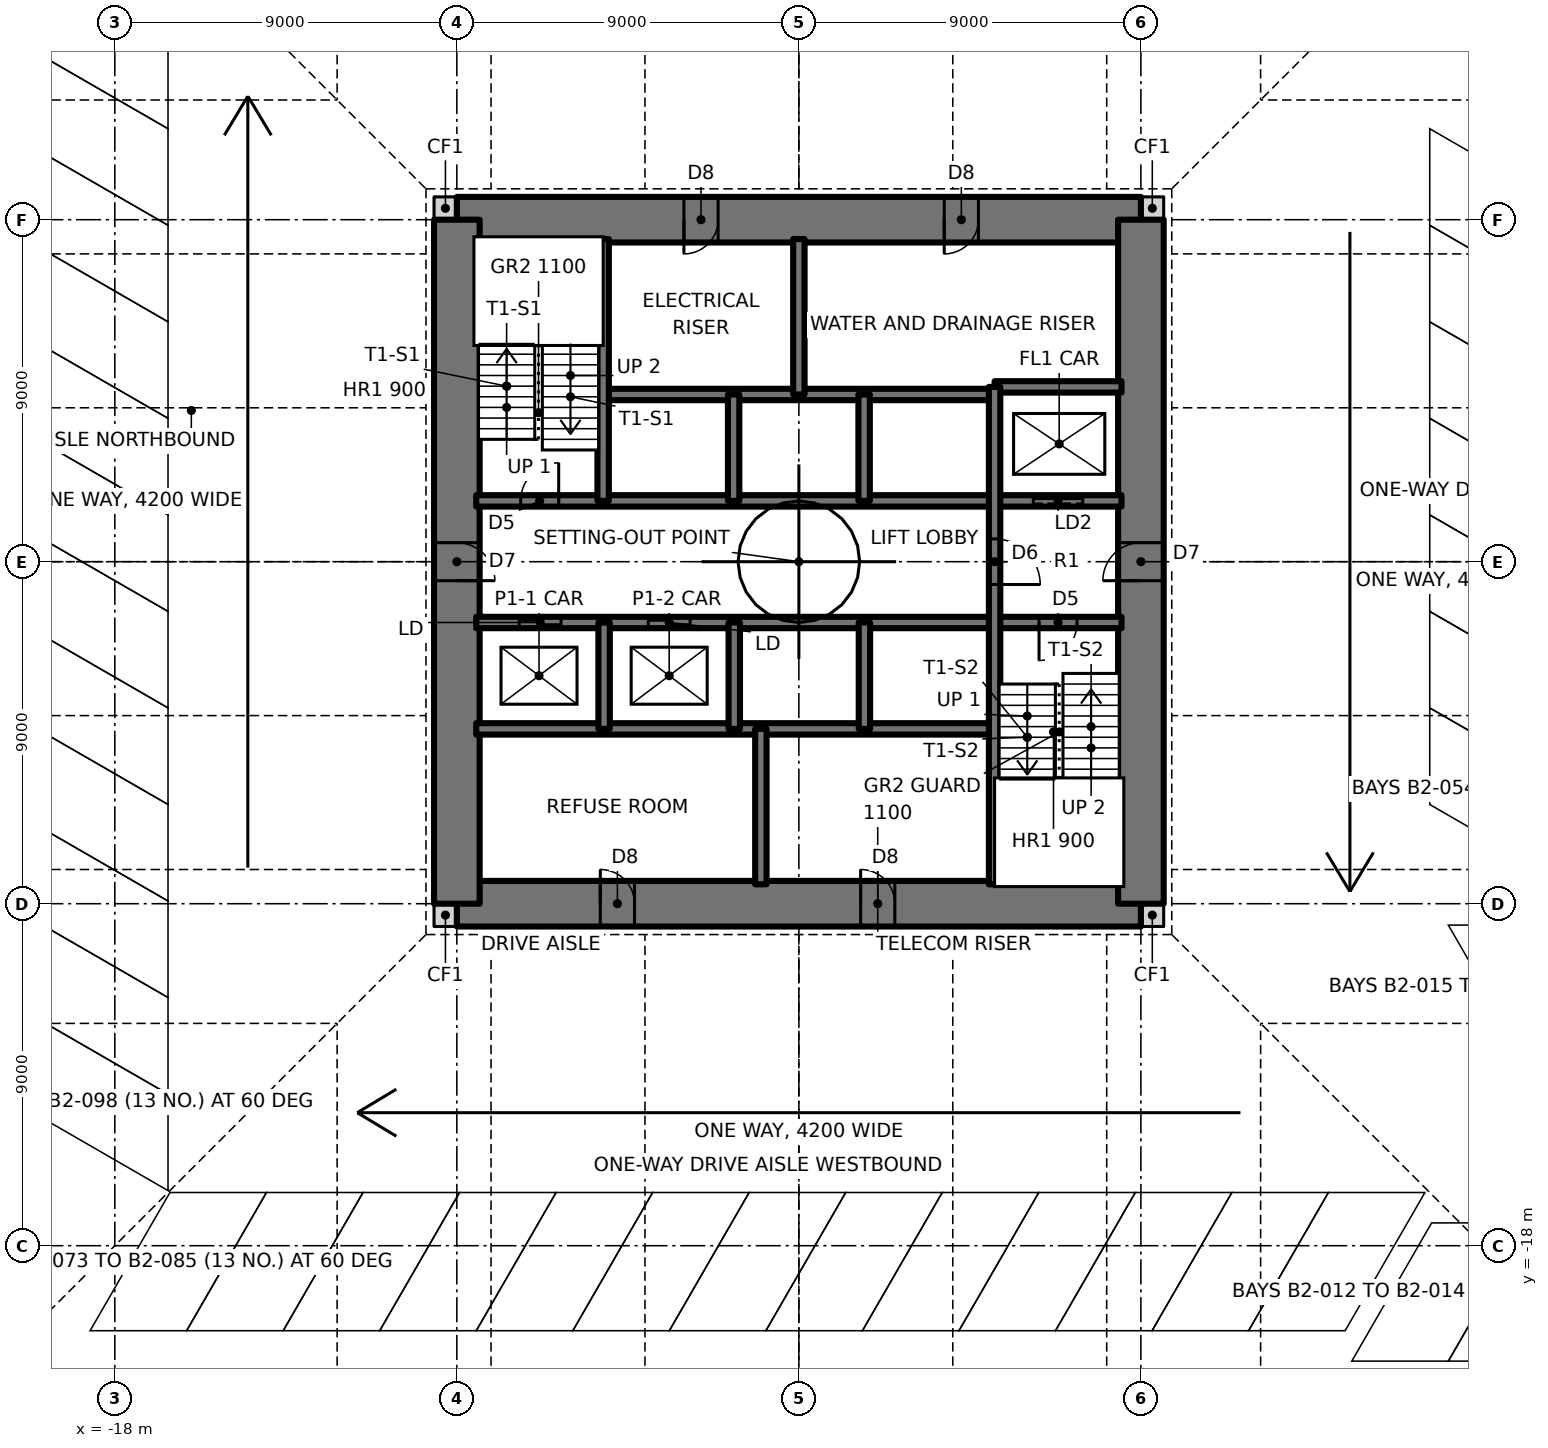
"""IFC4 building model, lengths in metres.
Left out: names, types, materials, properties, quantities, classifications, styles, units other than length and angle.
Written with IfcOpenShell. Run it as: python <this file> out.ifc"""

import sys

from ifc_helpers import new_model, si_unit, direction, frame, frame_2d, origin, place, context, subcontext, project, spatial, rectangle, extrude, element, fill, save


model = new_model("IFC4")
c1 = context("Model", 3, precision=1e-05, world=origin(), true_north=direction((0.0, 1.0)))
c2 = subcontext(c1, "Body", "Model", "MODEL_VIEW")
j1 = project(units=[si_unit("LENGTHUNIT", "METRE"), si_unit("PLANEANGLEUNIT", "RADIAN")], contexts=[c1])
p1 = place(None, origin())
s1 = spatial("IfcSite", under=j1, at=p1, CompositionType="ELEMENT")
p2 = place(p1, origin())
s2 = spatial("IfcBuilding", under=s1, at=p2, CompositionType="ELEMENT")
p3 = place(p2, frame((0.0, 0.0, -7.2)))
s3 = spatial("IfcBuildingStorey", under=s2, at=p3, CompositionType="ELEMENT", Elevation=-7.2)
for number, where, z_axis, x_axis in (
    (1, (-9.6, -9.3, -1.8), (0.0, 0.0, 1.0), (1.0, 0.0, 0.0)),
    (2, (9.0, -9.3, -1.8), (0.0, 0.0, 1.0), (1.0, 0.0, 0.0)),
    (3, (9.0, 9.3, -1.8), (0.0, 0.0, 1.0), (1.0, 0.0, 0.0)),
    (4, (-9.6, 9.3, -1.8), (0.0, 0.0, 1.0), (1.0, 0.0, 0.0)),
):
    element("IfcWall", number, at=place(p3, frame(where, z_axis=z_axis, x_axis=x_axis)), inside=s3, PredefinedType="SOLIDWALL", context=c2, shape_type="SweptSolid", body=[
        extrude(rectangle(XDim=0.6, YDim=0.6, at=frame_2d((0.3, 0.0))), origin(), (0.0, 0.0, 1.0), 5.4),
    ])
p4 = place(p3, frame((-9.0, -9.0, -1.8), z_axis=(0.0, 0.0, 1.0), x_axis=(1.0, 0.0, 0.0)))
e5 = element("IfcWall", 5, at=p4, inside=s3, PredefinedType="SHEAR", context=c2, shape_type="SweptSolid", body=[
    extrude(rectangle(XDim=18.0, YDim=1.2, at=frame_2d((9.0, 0.0))), origin(), (0.0, 0.0, 1.0), 5.4),
])
p5 = place(p4, frame((3.775, 0.0, 1.8)))
e6 = element("IfcOpeningElement", 6, at=p5, cuts=e5, PredefinedType="OPENING", context=c2, shape_type="SweptSolid", body=[
    extrude(rectangle(XDim=0.9, YDim=2.1, at=frame_2d((0.45, 1.05))), frame((0.0, 0.61, 0.0), z_axis=(0.0, -1.0, 0.0), x_axis=(1.0, 0.0, 0.0)), (0.0, 0.0, 1.0), 1.22),
])
p6 = place(p4, frame((10.625, 0.0, 1.8)))
e7 = element("IfcOpeningElement", 7, at=p6, cuts=e5, PredefinedType="OPENING", context=c2, shape_type="SweptSolid", body=[
    extrude(rectangle(XDim=0.9, YDim=2.1, at=frame_2d((0.45, 1.05))), frame((0.0, 0.61, 0.0), z_axis=(0.0, -1.0, 0.0), x_axis=(1.0, 0.0, 0.0)), (0.0, 0.0, 1.0), 1.22),
])
p7 = place(p3, frame((9.0, 9.0, -1.8), z_axis=(0.0, 0.0, 1.0), x_axis=(-1.0, 0.0, 0.0)))
e8 = element("IfcWall", 8, at=p7, inside=s3, PredefinedType="SHEAR", context=c2, shape_type="SweptSolid", body=[
    extrude(rectangle(XDim=18.0, YDim=1.2, at=frame_2d((9.0, 0.0))), origin(), (0.0, 0.0, 1.0), 5.4),
])
p8 = place(p7, frame((11.125, 0.0, 1.8)))
e9 = element("IfcOpeningElement", 9, at=p8, cuts=e8, PredefinedType="OPENING", context=c2, shape_type="SweptSolid", body=[
    extrude(rectangle(XDim=0.9, YDim=2.1, at=frame_2d((0.45, 1.05))), frame((0.0, 0.61, 0.0), z_axis=(0.0, -1.0, 0.0), x_axis=(1.0, 0.0, 0.0)), (0.0, 0.0, 1.0), 1.22),
])
p9 = place(p7, frame((4.275, 0.0, 1.8)))
e10 = element("IfcOpeningElement", 10, at=p9, cuts=e8, PredefinedType="OPENING", context=c2, shape_type="SweptSolid", body=[
    extrude(rectangle(XDim=0.9, YDim=2.1, at=frame_2d((0.45, 1.05))), frame((0.0, 0.61, 0.0), z_axis=(0.0, -1.0, 0.0), x_axis=(1.0, 0.0, 0.0)), (0.0, 0.0, 1.0), 1.22),
])
p10 = place(p3, frame((9.0, -9.0, -1.8), z_axis=(0.0, 0.0, 1.0), x_axis=(0.0, 1.0, 0.0)))
e11 = element("IfcWall", 11, at=p10, inside=s3, PredefinedType="SHEAR", context=c2, shape_type="SweptSolid", body=[
    extrude(rectangle(XDim=18.0, YDim=1.2, at=frame_2d((9.0, 0.0))), origin(), (0.0, 0.0, 1.0), 5.4),
])
p11 = place(p10, frame((8.5, 0.0, 1.8)))
e12 = element("IfcOpeningElement", 12, at=p11, cuts=e11, PredefinedType="OPENING", context=c2, shape_type="SweptSolid", body=[
    extrude(rectangle(XDim=1.0, YDim=2.1, at=frame_2d((0.5, 1.05))), frame((0.0, 0.61, 0.0), z_axis=(0.0, -1.0, 0.0), x_axis=(1.0, 0.0, 0.0)), (0.0, 0.0, 1.0), 1.22),
])
p12 = place(p3, frame((-9.0, 9.0, -1.8), z_axis=(0.0, 0.0, 1.0), x_axis=(0.0, -1.0, 0.0)))
e13 = element("IfcWall", 13, at=p12, inside=s3, PredefinedType="SHEAR", context=c2, shape_type="SweptSolid", body=[
    extrude(rectangle(XDim=18.0, YDim=1.2, at=frame_2d((9.0, 0.0))), origin(), (0.0, 0.0, 1.0), 5.4),
])
p13 = place(p12, frame((8.5, 0.0, 1.8)))
e14 = element("IfcOpeningElement", 14, at=p13, cuts=e13, PredefinedType="OPENING", context=c2, shape_type="SweptSolid", body=[
    extrude(rectangle(XDim=1.0, YDim=2.1, at=frame_2d((0.5, 1.05))), frame((0.0, 0.61, 0.0), z_axis=(0.0, -1.0, 0.0), x_axis=(1.0, 0.0, 0.0)), (0.0, 0.0, 1.0), 1.22),
])
p14 = place(p3, frame((-29.55, -18.0, -1.8), z_axis=(0.0, 0.0, 1.0), x_axis=(1.0, 0.0, 0.0)))
e15 = element("IfcWall", 15, at=p14, inside=s3, PredefinedType="SOLIDWALL", context=c2, shape_type="SweptSolid", body=[
    extrude(rectangle(XDim=59.1, YDim=0.45, at=frame_2d((29.55, 0.0))), origin(), (0.0, 0.0, 1.0), 1.5),
])
for number, where, z_axis, x_axis in (
    (16, (-29.55, -9.0, -1.8), (0.0, 0.0, 1.0), (1.0, 0.0, 0.0)),
    (17, (9.6, -9.0, -1.8), (0.0, 0.0, 1.0), (1.0, 0.0, 0.0)),
    (18, (-29.55, 0.0, -1.8), (0.0, 0.0, 1.0), (1.0, 0.0, 0.0)),
    (19, (9.6, 0.0, -1.8), (0.0, 0.0, 1.0), (1.0, 0.0, 0.0)),
    (20, (-29.55, 9.0, -1.8), (0.0, 0.0, 1.0), (1.0, 0.0, 0.0)),
    (21, (9.6, 9.0, -1.8), (0.0, 0.0, 1.0), (1.0, 0.0, 0.0)),
):
    element("IfcWall", number, at=place(p3, frame(where, z_axis=z_axis, x_axis=x_axis)), inside=s3, PredefinedType="SOLIDWALL", context=c2, shape_type="SweptSolid", body=[
        extrude(rectangle(XDim=19.95, YDim=0.45, at=frame_2d((9.975, 0.0))), origin(), (0.0, 0.0, 1.0), 1.5),
    ])
for number, where, z_axis, x_axis in (
    (22, (-18.0, -26.775, -1.8), (0.0, 0.0, 1.0), (0.0, 1.0, 0.0)),
    (23, (-18.0, -17.775, -1.8), (0.0, 0.0, 1.0), (0.0, 1.0, 0.0)),
    (24, (-18.0, -8.775, -1.8), (0.0, 0.0, 1.0), (0.0, 1.0, 0.0)),
    (25, (-18.0, 0.225, -1.8), (0.0, 0.0, 1.0), (0.0, 1.0, 0.0)),
    (26, (-18.0, 9.225, -1.8), (0.0, 0.0, 1.0), (0.0, 1.0, 0.0)),
    (27, (-9.0, -26.775, -1.8), (0.0, 0.0, 1.0), (0.0, 1.0, 0.0)),
):
    element("IfcWall", number, at=place(p3, frame(where, z_axis=z_axis, x_axis=x_axis)), inside=s3, PredefinedType="SOLIDWALL", context=c2, shape_type="SweptSolid", body=[
        extrude(rectangle(XDim=8.55, YDim=0.45, at=frame_2d((4.275, 0.0))), origin(), (0.0, 0.0, 1.0), 1.5),
    ])
for number, where, z_axis, x_axis in (
    (28, (-9.0, -17.775, -1.8), (0.0, 0.0, 1.0), (0.0, 1.0, 0.0)),
    (29, (-9.0, 9.6, -1.8), (0.0, 0.0, 1.0), (0.0, 1.0, 0.0)),
):
    element("IfcWall", number, at=place(p3, frame(where, z_axis=z_axis, x_axis=x_axis)), inside=s3, PredefinedType="SOLIDWALL", context=c2, shape_type="SweptSolid", body=[
        extrude(rectangle(XDim=8.175, YDim=0.45, at=frame_2d((4.087, 0.0))), origin(), (0.0, 0.0, 1.0), 1.5),
    ])
p15 = place(p3, frame((0.0, -26.775, -1.8), z_axis=(0.0, 0.0, 1.0), x_axis=(0.0, 1.0, 0.0)))
e30 = element("IfcWall", 30, at=p15, inside=s3, PredefinedType="SOLIDWALL", context=c2, shape_type="SweptSolid", body=[
    extrude(rectangle(XDim=8.55, YDim=0.45, at=frame_2d((4.275, 0.0))), origin(), (0.0, 0.0, 1.0), 1.5),
])
for number, where, z_axis, x_axis in (
    (31, (0.0, -17.775, -1.8), (0.0, 0.0, 1.0), (0.0, 1.0, 0.0)),
    (32, (0.0, 9.6, -1.8), (0.0, 0.0, 1.0), (0.0, 1.0, 0.0)),
):
    element("IfcWall", number, at=place(p3, frame(where, z_axis=z_axis, x_axis=x_axis)), inside=s3, PredefinedType="SOLIDWALL", context=c2, shape_type="SweptSolid", body=[
        extrude(rectangle(XDim=8.175, YDim=0.45, at=frame_2d((4.087, 0.0))), origin(), (0.0, 0.0, 1.0), 1.5),
    ])
p16 = place(p3, frame((9.0, -26.775, -1.8), z_axis=(0.0, 0.0, 1.0), x_axis=(0.0, 1.0, 0.0)))
e33 = element("IfcWall", 33, at=p16, inside=s3, PredefinedType="SOLIDWALL", context=c2, shape_type="SweptSolid", body=[
    extrude(rectangle(XDim=8.55, YDim=0.45, at=frame_2d((4.275, 0.0))), origin(), (0.0, 0.0, 1.0), 1.5),
])
for number, where, z_axis, x_axis in (
    (34, (9.0, -17.775, -1.8), (0.0, 0.0, 1.0), (0.0, 1.0, 0.0)),
    (35, (9.0, 9.6, -1.8), (0.0, 0.0, 1.0), (0.0, 1.0, 0.0)),
):
    element("IfcWall", number, at=place(p3, frame(where, z_axis=z_axis, x_axis=x_axis)), inside=s3, PredefinedType="SOLIDWALL", context=c2, shape_type="SweptSolid", body=[
        extrude(rectangle(XDim=8.175, YDim=0.45, at=frame_2d((4.087, 0.0))), origin(), (0.0, 0.0, 1.0), 1.5),
    ])
p17 = place(p3, frame((-8.49, -4.4, -1.8), z_axis=(0.0, 0.0, 1.0), x_axis=(1.0, 0.0, 0.0)))
e36 = element("IfcWall", 36, at=p17, inside=s3, PredefinedType="SOLIDWALL", context=c2, shape_type="SweptSolid", body=[
    extrude(rectangle(XDim=13.64, YDim=0.3, at=frame_2d((6.82, 0.0))), origin(), (0.0, 0.0, 1.0), 5.4),
])
p18 = place(p3, frame((-8.49, -1.6, -1.8), z_axis=(0.0, 0.0, 1.0), x_axis=(1.0, 0.0, 0.0)))
e37 = element("IfcWall", 37, at=p18, inside=s3, PredefinedType="SOLIDWALL", context=c2, shape_type="SweptSolid", body=[
    extrude(rectangle(XDim=16.98, YDim=0.3, at=frame_2d((8.49, 0.0))), origin(), (0.0, 0.0, 1.0), 5.4),
])
p19 = place(p18, frame((14.81, 0.0, 1.8)))
e38 = element("IfcOpeningElement", 38, at=p19, cuts=e37, PredefinedType="OPENING", context=c2, shape_type="SweptSolid", body=[
    extrude(rectangle(XDim=1.0, YDim=2.1, at=frame_2d((0.5, 1.05))), frame((0.0, 0.16, 0.0), z_axis=(0.0, -1.0, 0.0), x_axis=(1.0, 0.0, 0.0)), (0.0, 0.0, 1.0), 0.32),
])
p20 = place(p18, frame((1.133, 0.0, 1.8)))
e39 = element("IfcOpeningElement", 39, at=p20, cuts=e37, PredefinedType="OPENING", context=c2, shape_type="SweptSolid", body=[
    extrude(rectangle(XDim=1.1, YDim=2.1, at=frame_2d((0.55, 1.05))), frame((0.0, 0.16, 0.0), z_axis=(0.0, -1.0, 0.0), x_axis=(1.0, 0.0, 0.0)), (0.0, 0.0, 1.0), 0.32),
])
p21 = place(p18, frame((4.528, 0.0, 1.8)))
e40 = element("IfcOpeningElement", 40, at=p21, cuts=e37, PredefinedType="OPENING", context=c2, shape_type="SweptSolid", body=[
    extrude(rectangle(XDim=1.1, YDim=2.1, at=frame_2d((0.55, 1.05))), frame((0.0, 0.16, 0.0), z_axis=(0.0, -1.0, 0.0), x_axis=(1.0, 0.0, 0.0)), (0.0, 0.0, 1.0), 0.32),
])
p22 = place(p3, frame((-8.49, 1.6, -1.8), z_axis=(0.0, 0.0, 1.0), x_axis=(1.0, 0.0, 0.0)))
e41 = element("IfcWall", 41, at=p22, inside=s3, PredefinedType="SOLIDWALL", context=c2, shape_type="SweptSolid", body=[
    extrude(rectangle(XDim=16.98, YDim=0.3, at=frame_2d((8.49, 0.0))), origin(), (0.0, 0.0, 1.0), 5.4),
])
p23 = place(p22, frame((1.17, 0.0, 1.8)))
e42 = element("IfcOpeningElement", 42, at=p23, cuts=e41, PredefinedType="OPENING", context=c2, shape_type="SweptSolid", body=[
    extrude(rectangle(XDim=1.0, YDim=2.1, at=frame_2d((0.5, 1.05))), frame((0.0, 0.16, 0.0), z_axis=(0.0, -1.0, 0.0), x_axis=(1.0, 0.0, 0.0)), (0.0, 0.0, 1.0), 0.32),
])
p24 = place(p22, frame((14.66, 0.0, 1.8)))
e43 = element("IfcOpeningElement", 43, at=p24, cuts=e41, PredefinedType="OPENING", context=c2, shape_type="SweptSolid", body=[
    extrude(rectangle(XDim=1.3, YDim=2.1, at=frame_2d((0.65, 1.05))), frame((0.0, 0.16, 0.0), z_axis=(0.0, -1.0, 0.0), x_axis=(1.0, 0.0, 0.0)), (0.0, 0.0, 1.0), 0.32),
])
p25 = place(p3, frame((-5.15, 4.4, -1.8), z_axis=(0.0, 0.0, 1.0), x_axis=(1.0, 0.0, 0.0)))
e44 = element("IfcWall", 44, at=p25, inside=s3, PredefinedType="SOLIDWALL", context=c2, shape_type="SweptSolid", body=[
    extrude(rectangle(XDim=10.3, YDim=0.3, at=frame_2d((5.15, 0.0))), origin(), (0.0, 0.0, 1.0), 5.4),
])
p26 = place(p3, frame((5.15, 4.6, -1.8), z_axis=(0.0, 0.0, 1.0), x_axis=(1.0, 0.0, 0.0)))
e45 = element("IfcWall", 45, at=p26, inside=s3, PredefinedType="SOLIDWALL", context=c2, shape_type="SweptSolid", body=[
    extrude(rectangle(XDim=3.34, YDim=0.3, at=frame_2d((1.67, 0.0))), origin(), (0.0, 0.0, 1.0), 5.4),
])
p27 = place(p3, frame((5.15, -8.49, -1.8), z_axis=(0.0, 0.0, 1.0), x_axis=(0.0, 1.0, 0.0)))
e46 = element("IfcWall", 46, at=p27, inside=s3, PredefinedType="SOLIDWALL", context=c2, shape_type="SweptSolid", body=[
    extrude(rectangle(XDim=13.09, YDim=0.3, at=frame_2d((6.545, 0.0))), origin(), (0.0, 0.0, 1.0), 5.4),
])
p28 = place(p27, frame((7.89, 0.0, 1.8)))
e47 = element("IfcOpeningElement", 47, at=p28, cuts=e46, PredefinedType="OPENING", context=c2, shape_type="SweptSolid", body=[
    extrude(rectangle(XDim=1.2, YDim=2.1, at=frame_2d((0.6, 1.05))), frame((0.0, 0.16, 0.0), z_axis=(0.0, -1.0, 0.0), x_axis=(1.0, 0.0, 0.0)), (0.0, 0.0, 1.0), 0.32),
])
for number, where, z_axis, x_axis in (
    (48, (1.725, -4.4, -1.8), (0.0, 0.0, 1.0), (0.0, 1.0, 0.0)),
    (49, (1.717, 1.6, -1.8), (0.0, 0.0, 1.0), (0.0, 1.0, 0.0)),
):
    element("IfcWall", number, at=place(p3, frame(where, z_axis=z_axis, x_axis=x_axis)), inside=s3, PredefinedType="SOLIDWALL", context=c2, shape_type="SweptSolid", body=[
        extrude(rectangle(XDim=2.8, YDim=0.3, at=frame_2d((1.4, 0.0))), origin(), (0.0, 0.0, 1.0), 5.4),
    ])
for number, where, z_axis, x_axis in (
    (50, (0.0, 4.4, -1.8), (0.0, 0.0, 1.0), (0.0, 1.0, 0.0)),
    (51, (-1.0, -8.49, -1.8), (0.0, 0.0, 1.0), (0.0, 1.0, 0.0)),
):
    element("IfcWall", number, at=place(p3, frame(where, z_axis=z_axis, x_axis=x_axis)), inside=s3, PredefinedType="SOLIDWALL", context=c2, shape_type="SweptSolid", body=[
        extrude(rectangle(XDim=4.09, YDim=0.3, at=frame_2d((2.045, 0.0))), origin(), (0.0, 0.0, 1.0), 5.4),
    ])
for number, where, z_axis, x_axis in (
    (52, (-1.7, -4.4, -1.8), (0.0, 0.0, 1.0), (0.0, 1.0, 0.0)),
    (53, (-1.717, 1.6, -1.8), (0.0, 0.0, 1.0), (0.0, 1.0, 0.0)),
    (54, (-5.125, -4.4, -1.8), (0.0, 0.0, 1.0), (0.0, 1.0, 0.0)),
):
    element("IfcWall", number, at=place(p3, frame(where, z_axis=z_axis, x_axis=x_axis)), inside=s3, PredefinedType="SOLIDWALL", context=c2, shape_type="SweptSolid", body=[
        extrude(rectangle(XDim=2.8, YDim=0.3, at=frame_2d((1.4, 0.0))), origin(), (0.0, 0.0, 1.0), 5.4),
    ])
p29 = place(p3, frame((-5.15, 1.6, -1.8), z_axis=(0.0, 0.0, 1.0), x_axis=(0.0, 1.0, 0.0)))
e55 = element("IfcWall", 55, at=p29, inside=s3, PredefinedType="SOLIDWALL", context=c2, shape_type="SweptSolid", body=[
    extrude(rectangle(XDim=6.89, YDim=0.3, at=frame_2d((3.445, 0.0))), origin(), (0.0, 0.0, 1.0), 5.4),
])
p30 = place(p23, origin())
e56 = element("IfcDoor", 56, at=p30, inside=s3, OperationType="SINGLE_SWING_RIGHT", PredefinedType="DOOR", context=c2, shape_type="SweptSolid", body=[
    extrude(rectangle(XDim=1.0, YDim=2.1, at=frame_2d((0.5, 1.05))), frame((0.0, 0.025, 0.0), z_axis=(0.0, -1.0, 0.0), x_axis=(1.0, 0.0, 0.0)), (0.0, 0.0, 1.0), 0.05),
])
fill(e42, e56)
p31 = place(p19, frame((1.0, 0.0, 0.0), z_axis=(0.0, 0.0, 1.0), x_axis=(-1.0, 0.0, 0.0)))
e57 = element("IfcDoor", 57, at=p31, inside=s3, OperationType="SINGLE_SWING_RIGHT", PredefinedType="DOOR", context=c2, shape_type="SweptSolid", body=[
    extrude(rectangle(XDim=1.0, YDim=2.1, at=frame_2d((0.5, 1.05))), frame((0.0, 0.025, 0.0), z_axis=(0.0, -1.0, 0.0), x_axis=(1.0, 0.0, 0.0)), (0.0, 0.0, 1.0), 0.05),
])
fill(e38, e57)
p32 = place(p28, frame((1.2, 0.0, 0.0), z_axis=(0.0, 0.0, 1.0), x_axis=(-1.0, 0.0, 0.0)))
e58 = element("IfcDoor", 58, at=p32, inside=s3, OperationType="SINGLE_SWING_RIGHT", PredefinedType="DOOR", context=c2, shape_type="SweptSolid", body=[
    extrude(rectangle(XDim=1.2, YDim=2.1, at=frame_2d((0.6, 1.05))), frame((0.0, 0.025, 0.0), z_axis=(0.0, -1.0, 0.0), x_axis=(1.0, 0.0, 0.0)), (0.0, 0.0, 1.0), 0.05),
])
fill(e47, e58)
p33 = place(p13, origin())
e59 = element("IfcDoor", 59, at=p33, inside=s3, OperationType="SINGLE_SWING_RIGHT", PredefinedType="DOOR", context=c2, shape_type="SweptSolid", body=[
    extrude(rectangle(XDim=1.0, YDim=2.1, at=frame_2d((0.5, 1.05))), frame((0.0, 0.025, 0.0), z_axis=(0.0, -1.0, 0.0), x_axis=(1.0, 0.0, 0.0)), (0.0, 0.0, 1.0), 0.05),
])
fill(e14, e59)
p34 = place(p11, origin())
e60 = element("IfcDoor", 60, at=p34, inside=s3, OperationType="SINGLE_SWING_LEFT", PredefinedType="DOOR", context=c2, shape_type="SweptSolid", body=[
    extrude(rectangle(XDim=1.0, YDim=2.1, at=frame_2d((0.5, 1.05))), frame((0.0, 0.025, 0.0), z_axis=(0.0, -1.0, 0.0), x_axis=(1.0, 0.0, 0.0)), (0.0, 0.0, 1.0), 0.05),
])
fill(e12, e60)
p35 = place(p8, origin())
e61 = element("IfcDoor", 61, at=p35, inside=s3, OperationType="SINGLE_SWING_RIGHT", PredefinedType="DOOR", context=c2, shape_type="SweptSolid", body=[
    extrude(rectangle(XDim=0.9, YDim=2.1, at=frame_2d((0.45, 1.05))), frame((0.0, 0.025, 0.0), z_axis=(0.0, -1.0, 0.0), x_axis=(1.0, 0.0, 0.0)), (0.0, 0.0, 1.0), 0.05),
])
fill(e9, e61)
p36 = place(p9, origin())
e62 = element("IfcDoor", 62, at=p36, inside=s3, OperationType="SINGLE_SWING_RIGHT", PredefinedType="DOOR", context=c2, shape_type="SweptSolid", body=[
    extrude(rectangle(XDim=0.9, YDim=2.1, at=frame_2d((0.45, 1.05))), frame((0.0, 0.025, 0.0), z_axis=(0.0, -1.0, 0.0), x_axis=(1.0, 0.0, 0.0)), (0.0, 0.0, 1.0), 0.05),
])
fill(e10, e62)
p37 = place(p5, origin())
e63 = element("IfcDoor", 63, at=p37, inside=s3, OperationType="SINGLE_SWING_LEFT", PredefinedType="DOOR", context=c2, shape_type="SweptSolid", body=[
    extrude(rectangle(XDim=0.9, YDim=2.1, at=frame_2d((0.45, 1.05))), frame((0.0, 0.025, 0.0), z_axis=(0.0, -1.0, 0.0), x_axis=(1.0, 0.0, 0.0)), (0.0, 0.0, 1.0), 0.05),
])
fill(e6, e63)
p38 = place(p6, origin())
e64 = element("IfcDoor", 64, at=p38, inside=s3, OperationType="SINGLE_SWING_LEFT", PredefinedType="DOOR", context=c2, shape_type="SweptSolid", body=[
    extrude(rectangle(XDim=0.9, YDim=2.1, at=frame_2d((0.45, 1.05))), frame((0.0, 0.025, 0.0), z_axis=(0.0, -1.0, 0.0), x_axis=(1.0, 0.0, 0.0)), (0.0, 0.0, 1.0), 0.05),
])
fill(e7, e64)
p39 = place(p20, origin())
e65 = element("IfcDoor", 65, at=p39, inside=s3, OperationType="DOUBLE_DOOR_SLIDING", PredefinedType="DOOR", context=c2, shape_type="SweptSolid", body=[
    extrude(rectangle(XDim=1.1, YDim=2.1, at=frame_2d((0.55, 1.05))), frame((0.0, 0.025, 0.0), z_axis=(0.0, -1.0, 0.0), x_axis=(1.0, 0.0, 0.0)), (0.0, 0.0, 1.0), 0.05),
])
fill(e39, e65)
p40 = place(p21, origin())
e66 = element("IfcDoor", 66, at=p40, inside=s3, OperationType="DOUBLE_DOOR_SLIDING", PredefinedType="DOOR", context=c2, shape_type="SweptSolid", body=[
    extrude(rectangle(XDim=1.1, YDim=2.1, at=frame_2d((0.55, 1.05))), frame((0.0, 0.025, 0.0), z_axis=(0.0, -1.0, 0.0), x_axis=(1.0, 0.0, 0.0)), (0.0, 0.0, 1.0), 0.05),
])
fill(e40, e66)
p41 = place(p24, origin())
e67 = element("IfcDoor", 67, at=p41, inside=s3, OperationType="SLIDING_TO_LEFT", PredefinedType="DOOR", context=c2, shape_type="SweptSolid", body=[
    extrude(rectangle(XDim=1.3, YDim=2.1, at=frame_2d((0.65, 1.05))), frame((0.0, 0.025, 0.0), z_axis=(0.0, -1.0, 0.0), x_axis=(1.0, 0.0, 0.0)), (0.0, 0.0, 1.0), 0.05),
])
fill(e43, e67)
save(model, sys.argv[1])
